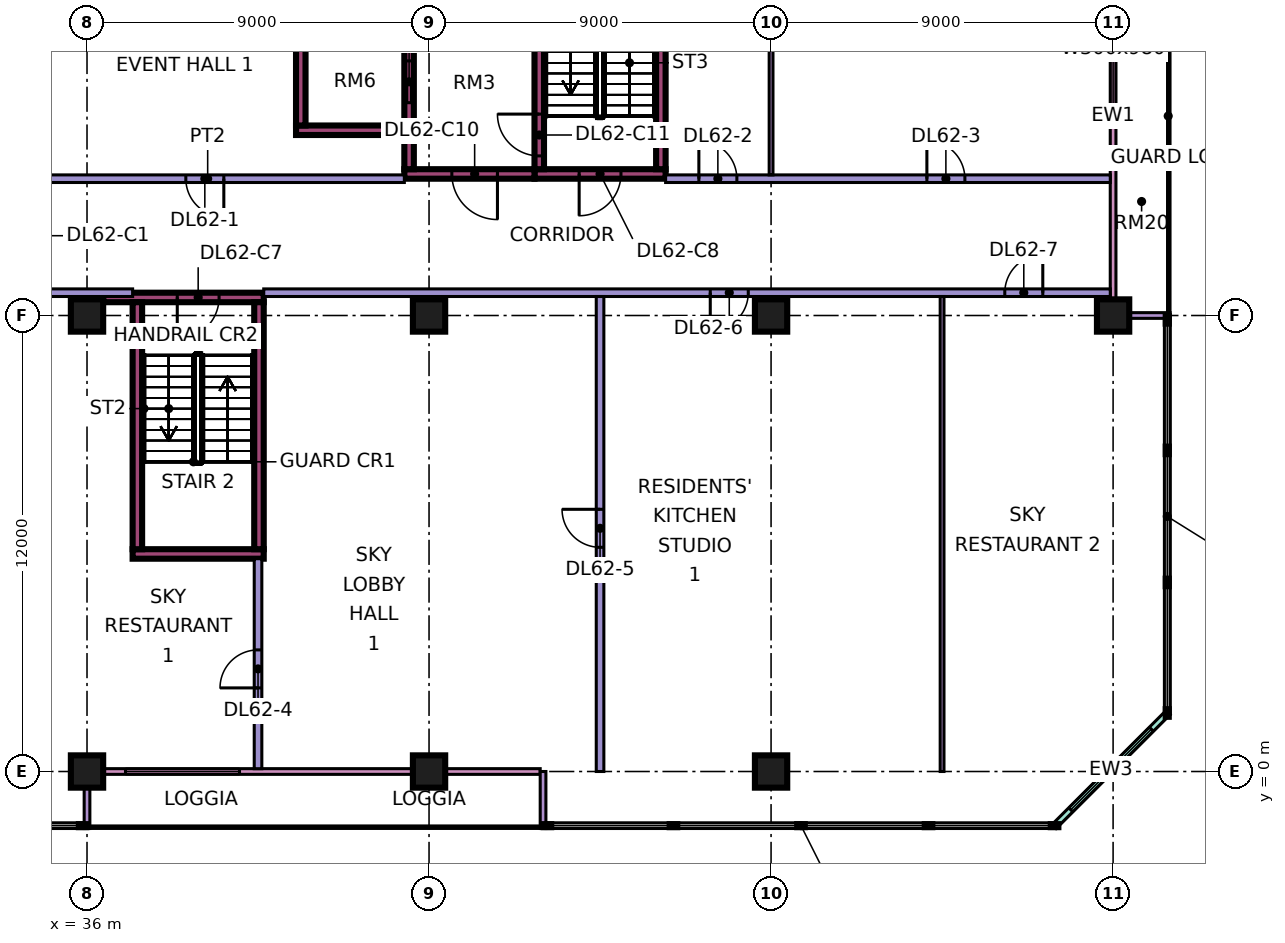
"""IFC4 building model, lengths in metres.
Left out: names, types, materials, properties, quantities, classifications, styles, units other than length and angle.
Written with IfcOpenShell. Run it as: python <this file> out.ifc"""

import sys

from ifc_helpers import new_model, si_unit, direction, frame, frame_2d, origin, origin_2d, place, context, subcontext, project, spatial, rectangle, extrude, element, fill, save


model = new_model("IFC4")
c1 = context("Model", 3, precision=1e-05, world=origin(), true_north=direction((0.0, 1.0)))
c2 = subcontext(c1, "Body", "Model", "MODEL_VIEW")
j1 = project(units=[si_unit("LENGTHUNIT", "METRE"), si_unit("PLANEANGLEUNIT", "RADIAN")], contexts=[c1])
p1 = place(None, origin())
s1 = spatial("IfcSite", under=j1, at=p1, CompositionType="ELEMENT")
p2 = place(p1, origin())
s2 = spatial("IfcBuilding", under=s1, at=p2, CompositionType="ELEMENT")
p3 = place(p2, frame((0.0, 0.0, 262.15)))
s3 = spatial("IfcBuildingStorey", under=s2, at=p3, CompositionType="ELEMENT", Elevation=262.15)
for number, where, z_axis, x_axis in (
    (1, (36.0, 0.0, 0.0), (0.0, 0.0, 1.0), (1.0, 0.0, 0.0)),
    (2, (36.0, 12.0, 0.0), (0.0, 0.0, 1.0), (1.0, 0.0, 0.0)),
    (3, (45.0, 0.0, 0.0), (0.0, 0.0, 1.0), (1.0, 0.0, 0.0)),
    (4, (45.0, 12.0, 0.0), (0.0, 0.0, 1.0), (1.0, 0.0, 0.0)),
    (5, (54.0, 0.0, 0.0), (0.0, 0.0, 1.0), (1.0, 0.0, 0.0)),
    (6, (54.0, 12.0, 0.0), (0.0, 0.0, 1.0), (1.0, 0.0, 0.0)),
    (7, (63.0, 12.0, 0.0), (0.0, 0.0, 1.0), (1.0, 0.0, 0.0)),
):
    element("IfcColumn", number, at=place(p3, frame(where, z_axis=z_axis, x_axis=x_axis)), inside=s3, PredefinedType="COLUMN", context=c2, shape_type="SweptSolid", body=[
        extrude(rectangle(XDim=0.85, YDim=0.85, at=origin_2d()), origin(), (0.0, 0.0, 1.0), 11.25),
    ])
p4 = place(p3, frame((37.2, 5.725, 0.0), z_axis=(0.0, 0.0, 1.0), x_axis=(1.0, 0.0, 0.0)))
e8 = element("IfcWall", 8, at=p4, inside=s3, PredefinedType="SHEAR", context=c2, shape_type="SweptSolid", body=[
    extrude(rectangle(XDim=3.45, YDim=0.25, at=frame_2d((1.725, 0.0))), origin(), (0.0, 0.0, 1.0), 11.25),
])
p5 = place(p3, frame((36.425, 12.475, 0.0), z_axis=(0.0, 0.0, 1.0), x_axis=(1.0, 0.0, 0.0)))
e9 = element("IfcWall", 9, at=p5, inside=s3, PredefinedType="SHEAR", context=c2, shape_type="SweptSolid", body=[
    extrude(rectangle(XDim=4.225, YDim=0.25, at=frame_2d((2.112, 0.0))), origin(), (0.0, 0.0, 1.0), 11.25),
])
p6 = place(p5, frame((1.95, 0.0, 0.0)))
e10 = element("IfcOpeningElement", 10, at=p6, cuts=e9, PredefinedType="OPENING", context=c2, shape_type="SweptSolid", body=[
    extrude(rectangle(XDim=1.1, YDim=2.2, at=frame_2d((0.55, 1.1))), frame((0.0, 0.135, 0.0), z_axis=(0.0, -1.0, 0.0), x_axis=(1.0, 0.0, 0.0)), (0.0, 0.0, 1.0), 0.27),
])
for number, where, z_axis, x_axis in (
    (11, (37.325, 5.85, 0.0), (0.0, 0.0, 1.0), (0.0, 1.0, 0.0)),
    (12, (40.525, 5.85, 0.0), (0.0, 0.0, 1.0), (0.0, 1.0, 0.0)),
):
    element("IfcWall", number, at=place(p3, frame(where, z_axis=z_axis, x_axis=x_axis)), inside=s3, PredefinedType="SHEAR", context=c2, shape_type="SweptSolid", body=[
        extrude(rectangle(XDim=6.5, YDim=0.25, at=frame_2d((3.25, 0.0))), origin(), (0.0, 0.0, 1.0), 11.25),
    ])
p7 = place(p3, frame((47.775, 15.725, 0.0), z_axis=(0.0, 0.0, 1.0), x_axis=(1.0, 0.0, 0.0)))
e13 = element("IfcWall", 13, at=p7, inside=s3, PredefinedType="SHEAR", context=c2, shape_type="SweptSolid", body=[
    extrude(rectangle(XDim=3.45, YDim=0.25, at=frame_2d((1.725, 0.0))), origin(), (0.0, 0.0, 1.0), 11.25),
])
p8 = place(p7, frame((1.175, 0.0, 0.0)))
e14 = element("IfcOpeningElement", 14, at=p8, cuts=e13, PredefinedType="OPENING", context=c2, shape_type="SweptSolid", body=[
    extrude(rectangle(XDim=1.1, YDim=2.2, at=frame_2d((0.55, 1.1))), frame((0.0, 0.135, 0.0), z_axis=(0.0, -1.0, 0.0), x_axis=(1.0, 0.0, 0.0)), (0.0, 0.0, 1.0), 0.27),
])
p9 = place(p3, frame((47.9, 15.85, 0.0), z_axis=(0.0, 0.0, 1.0), x_axis=(0.0, 1.0, 0.0)))
e15 = element("IfcWall", 15, at=p9, inside=s3, PredefinedType="SHEAR", context=c2, shape_type="SweptSolid", body=[
    extrude(rectangle(XDim=6.5, YDim=0.25, at=frame_2d((3.25, 0.0))), origin(), (0.0, 0.0, 1.0), 11.25),
])
p10 = place(p9, frame((0.35, 0.0, 0.0)))
e16 = element("IfcOpeningElement", 16, at=p10, cuts=e15, PredefinedType="OPENING", context=c2, shape_type="SweptSolid", body=[
    extrude(rectangle(XDim=1.1, YDim=2.2, at=frame_2d((0.55, 1.1))), frame((0.0, 0.135, 0.0), z_axis=(0.0, -1.0, 0.0), x_axis=(1.0, 0.0, 0.0)), (0.0, 0.0, 1.0), 0.27),
])
p11 = place(p3, frame((51.1, 15.85, 0.0), z_axis=(0.0, 0.0, 1.0), x_axis=(0.0, 1.0, 0.0)))
e17 = element("IfcWall", 17, at=p11, inside=s3, PredefinedType="SHEAR", context=c2, shape_type="SweptSolid", body=[
    extrude(rectangle(XDim=6.5, YDim=0.25, at=frame_2d((3.25, 0.0))), origin(), (0.0, 0.0, 1.0), 11.25),
])
p12 = place(p3, frame((44.35, 15.725, 0.0), z_axis=(0.0, 0.0, 1.0), x_axis=(1.0, 0.0, 0.0)))
e18 = element("IfcWall", 18, at=p12, inside=s3, PredefinedType="SHEAR", context=c2, shape_type="SweptSolid", body=[
    extrude(rectangle(XDim=3.425, YDim=0.25, at=frame_2d((1.712, 0.0))), origin(), (0.0, 0.0, 1.0), 11.25),
])
p13 = place(p12, frame((1.25, 0.0, 0.0)))
e19 = element("IfcOpeningElement", 19, at=p13, cuts=e18, PredefinedType="OPENING", context=c2, shape_type="SweptSolid", body=[
    extrude(rectangle(XDim=1.2, YDim=2.2, at=frame_2d((0.6, 1.1))), frame((0.0, 0.135, 0.0), z_axis=(0.0, -1.0, 0.0), x_axis=(1.0, 0.0, 0.0)), (0.0, 0.0, 1.0), 0.27),
])
p14 = place(p3, frame((44.475, 15.85, 0.0), z_axis=(0.0, 0.0, 1.0), x_axis=(0.0, 1.0, 0.0)))
e20 = element("IfcWall", 20, at=p14, inside=s3, PredefinedType="SHEAR", context=c2, shape_type="SweptSolid", body=[
    extrude(rectangle(XDim=6.5, YDim=0.25, at=frame_2d((3.25, 0.0))), origin(), (0.0, 0.0, 1.0), 11.25),
])
p15 = place(p14, frame((1.75, 0.0, 0.0)))
e21 = element("IfcOpeningElement", 21, at=p15, cuts=e20, PredefinedType="OPENING", context=c2, shape_type="SweptSolid", body=[
    extrude(rectangle(XDim=1.1, YDim=2.2, at=frame_2d((0.55, 1.1))), frame((0.0, 0.135, 0.0), z_axis=(0.0, -1.0, 0.0), x_axis=(1.0, 0.0, 0.0)), (0.0, 0.0, 1.0), 0.27),
])
p16 = place(p14, frame((4.3, 0.0, 0.0)))
e22 = element("IfcOpeningElement", 22, at=p16, cuts=e20, PredefinedType="OPENING", context=c2, shape_type="SweptSolid", body=[
    extrude(rectangle(XDim=1.1, YDim=2.2, at=frame_2d((0.55, 1.1))), frame((0.0, 0.135, 0.0), z_axis=(0.0, -1.0, 0.0), x_axis=(1.0, 0.0, 0.0)), (0.0, 0.0, 1.0), 0.27),
])
p17 = place(p3, frame((41.5, 16.875, 0.0), z_axis=(0.0, 0.0, 1.0), x_axis=(1.0, 0.0, 0.0)))
e23 = element("IfcWall", 23, at=p17, inside=s3, PredefinedType="SHEAR", context=c2, shape_type="SweptSolid", body=[
    extrude(rectangle(XDim=2.85, YDim=0.25, at=frame_2d((1.425, 0.0))), origin(), (0.0, 0.0, 1.0), 11.25),
])
p18 = place(p3, frame((41.625, 17.0, 0.0), z_axis=(0.0, 0.0, 1.0), x_axis=(0.0, 1.0, 0.0)))
e24 = element("IfcWall", 24, at=p18, inside=s3, PredefinedType="SHEAR", context=c2, shape_type="SweptSolid", body=[
    extrude(rectangle(XDim=2.3, YDim=0.25, at=frame_2d((1.15, 0.0))), origin(), (0.0, 0.0, 1.0), 11.25),
])
p19 = place(p3, frame((36.075, 0.0, 0.0), z_axis=(0.0, 0.0, 1.0), x_axis=(1.0, 0.0, 0.0)))
e25 = element("IfcWall", 25, at=p19, inside=s3, PredefinedType="SOLIDWALL", context=c2, shape_type="SweptSolid", body=[
    extrude(rectangle(XDim=11.85, YDim=0.15, at=frame_2d((5.925, 0.0))), origin(), (0.0, 0.0, 1.0), 10.85),
])
p20 = place(p19, frame((0.938, 0.0, 0.45)))
e26 = element("IfcOpeningElement", 26, at=p20, cuts=e25, PredefinedType="OPENING", context=c2, shape_type="SweptSolid", body=[
    extrude(rectangle(XDim=3.0, YDim=9.8, at=frame_2d((1.5, 4.9))), frame((0.0, 0.085, 0.0), z_axis=(0.0, -1.0, 0.0), x_axis=(1.0, 0.0, 0.0)), (0.0, 0.0, 1.0), 0.17),
])
for number, where, z_axis, x_axis in (
    (27, (36.0, -1.5, 0.0), (0.0, 0.0, 1.0), (0.0, 1.0, 0.0)),
    (28, (48.0, -1.5, 0.0), (0.0, 0.0, 1.0), (0.0, 1.0, 0.0)),
):
    element("IfcWall", number, at=place(p3, frame(where, z_axis=z_axis, x_axis=x_axis)), inside=s3, PredefinedType="SOLIDWALL", context=c2, shape_type="SweptSolid", body=[
        extrude(rectangle(XDim=1.5, YDim=0.15, at=frame_2d((0.75, 0.0))), origin(), (0.0, 0.0, 1.0), 10.85),
    ])
p21 = place(p3, frame((61.447, -1.447, 0.0), z_axis=(0.0, 0.0, 1.0), x_axis=(0.707106781187, 0.707106781187, 0.0)))
e29 = element("IfcWall", 29, at=p21, inside=s3, PredefinedType="SOLIDWALL", context=c2, shape_type="SweptSolid", body=[
    extrude(rectangle(XDim=4.243, YDim=0.15, at=frame_2d((2.121, 0.0))), origin(), (0.0, 0.0, 1.0), 10.85),
])
p22 = place(p21, frame((0.621, 0.0, 0.45)))
e30 = element("IfcOpeningElement", 30, at=p22, cuts=e29, PredefinedType="OPENING", context=c2, shape_type="SweptSolid", body=[
    extrude(rectangle(XDim=3.0, YDim=9.8, at=frame_2d((1.5, 4.9))), frame((0.0, 0.085, 0.0), z_axis=(0.0, -1.0, 0.0), x_axis=(1.0, 0.0, 0.0)), (0.0, 0.0, 1.0), 0.17),
])
p23 = place(p3, frame((63.0, 12.075, 0.0), z_axis=(0.0, 0.0, 1.0), x_axis=(0.0, 1.0, 0.0)))
e31 = element("IfcWall", 31, at=p23, inside=s3, PredefinedType="SOLIDWALL", context=c2, shape_type="SweptSolid", body=[
    extrude(rectangle(XDim=10.35, YDim=0.15, at=frame_2d((5.175, 0.0))), origin(), (0.0, 0.0, 1.0), 10.85),
])
p24 = place(p23, frame((5.438, 0.0, 0.45)))
e32 = element("IfcOpeningElement", 32, at=p24, cuts=e31, PredefinedType="OPENING", context=c2, shape_type="SweptSolid", body=[
    extrude(rectangle(XDim=3.0, YDim=9.8, at=frame_2d((1.5, 4.9))), frame((0.0, 0.085, 0.0), z_axis=(0.0, -1.0, 0.0), x_axis=(1.0, 0.0, 0.0)), (0.0, 0.0, 1.0), 0.17),
])
p25 = place(p3, frame((64.5, 12.0, 0.0), z_axis=(0.0, 0.0, 1.0), x_axis=(-1.0, 0.0, 0.0)))
e33 = element("IfcWall", 33, at=p25, inside=s3, PredefinedType="SOLIDWALL", context=c2, shape_type="SweptSolid", body=[
    extrude(rectangle(XDim=1.5, YDim=0.15, at=frame_2d((0.75, 0.0))), origin(), (0.0, 0.0, 1.0), 10.85),
])
p26 = place(p3, frame((34.0, 12.6, 0.0), z_axis=(0.0, 0.0, 1.0), x_axis=(1.0, 0.0, 0.0)))
e34 = element("IfcWall", 34, at=p26, inside=s3, PredefinedType="PARTITIONING", context=c2, shape_type="SweptSolid", body=[
    extrude(rectangle(XDim=3.2, YDim=0.2, at=frame_2d((1.6, 0.0))), origin(), (0.0, 0.0, 1.0), 10.85),
])
p27 = place(p3, frame((34.0, 15.6, 0.0), z_axis=(0.0, 0.0, 1.0), x_axis=(1.0, 0.0, 0.0)))
e35 = element("IfcWall", 35, at=p27, inside=s3, PredefinedType="PARTITIONING", context=c2, shape_type="SweptSolid", body=[
    extrude(rectangle(XDim=10.35, YDim=0.2, at=frame_2d((5.175, 0.0))), origin(), (0.0, 0.0, 1.0), 10.85),
])
p28 = place(p27, frame((4.6, 0.0, 0.0)))
e36 = element("IfcOpeningElement", 36, at=p28, cuts=e35, PredefinedType="OPENING", context=c2, shape_type="SweptSolid", body=[
    extrude(rectangle(XDim=1.0, YDim=2.1, at=frame_2d((0.5, 1.05))), frame((0.0, 0.11, 0.0), z_axis=(0.0, -1.0, 0.0), x_axis=(1.0, 0.0, 0.0)), (0.0, 0.0, 1.0), 0.22),
])
p29 = place(p3, frame((40.5, 0.074, 0.0), z_axis=(0.0, 0.0, 1.0), x_axis=(0.0, 1.0, 0.0)))
e37 = element("IfcWall", 37, at=p29, inside=s3, PredefinedType="PARTITIONING", context=c2, shape_type="SweptSolid", body=[
    extrude(rectangle(XDim=5.526, YDim=0.2, at=frame_2d((2.763, 0.0))), origin(), (0.0, 0.0, 1.0), 10.85),
])
p30 = place(p29, frame((2.126, 0.0, 0.0)))
e38 = element("IfcOpeningElement", 38, at=p30, cuts=e37, PredefinedType="OPENING", context=c2, shape_type="SweptSolid", body=[
    extrude(rectangle(XDim=1.0, YDim=2.1, at=frame_2d((0.5, 1.05))), frame((0.0, 0.11, 0.0), z_axis=(0.0, -1.0, 0.0), x_axis=(1.0, 0.0, 0.0)), (0.0, 0.0, 1.0), 0.22),
])
p31 = place(p3, frame((40.65, 12.6, 0.0), z_axis=(0.0, 0.0, 1.0), x_axis=(1.0, 0.0, 0.0)))
e39 = element("IfcWall", 39, at=p31, inside=s3, PredefinedType="PARTITIONING", context=c2, shape_type="SweptSolid", body=[
    extrude(rectangle(XDim=22.276, YDim=0.2, at=frame_2d((11.138, 0.0))), origin(), (0.0, 0.0, 1.0), 10.85),
])
p32 = place(p31, frame((11.75, 0.0, 0.0)))
e40 = element("IfcOpeningElement", 40, at=p32, cuts=e39, PredefinedType="OPENING", context=c2, shape_type="SweptSolid", body=[
    extrude(rectangle(XDim=1.0, YDim=2.1, at=frame_2d((0.5, 1.05))), frame((0.0, 0.11, 0.0), z_axis=(0.0, -1.0, 0.0), x_axis=(1.0, 0.0, 0.0)), (0.0, 0.0, 1.0), 0.22),
])
p33 = place(p31, frame((19.5, 0.0, 0.0)))
e41 = element("IfcOpeningElement", 41, at=p33, cuts=e39, PredefinedType="OPENING", context=c2, shape_type="SweptSolid", body=[
    extrude(rectangle(XDim=1.0, YDim=2.1, at=frame_2d((0.5, 1.05))), frame((0.0, 0.11, 0.0), z_axis=(0.0, -1.0, 0.0), x_axis=(1.0, 0.0, 0.0)), (0.0, 0.0, 1.0), 0.22),
])
p34 = place(p3, frame((49.5, 0.0, 0.0), z_axis=(0.0, 0.0, 1.0), x_axis=(0.0, 1.0, 0.0)))
e42 = element("IfcWall", 42, at=p34, inside=s3, PredefinedType="PARTITIONING", context=c2, shape_type="SweptSolid", body=[
    extrude(rectangle(XDim=12.5, YDim=0.2, at=frame_2d((6.25, 0.0))), origin(), (0.0, 0.0, 1.0), 10.85),
])
p35 = place(p34, frame((5.9, 0.0, 0.0)))
e43 = element("IfcOpeningElement", 43, at=p35, cuts=e42, PredefinedType="OPENING", context=c2, shape_type="SweptSolid", body=[
    extrude(rectangle(XDim=1.0, YDim=2.1, at=frame_2d((0.5, 1.05))), frame((0.0, 0.11, 0.0), z_axis=(0.0, -1.0, 0.0), x_axis=(1.0, 0.0, 0.0)), (0.0, 0.0, 1.0), 0.22),
])
p36 = place(p3, frame((51.225, 15.6, 0.0), z_axis=(0.0, 0.0, 1.0), x_axis=(1.0, 0.0, 0.0)))
e44 = element("IfcWall", 44, at=p36, inside=s3, PredefinedType="PARTITIONING", context=c2, shape_type="SweptSolid", body=[
    extrude(rectangle(XDim=11.701, YDim=0.2, at=frame_2d((5.851, 0.0))), origin(), (0.0, 0.0, 1.0), 10.85),
])
p37 = place(p36, frame((0.875, 0.0, 0.0)))
e45 = element("IfcOpeningElement", 45, at=p37, cuts=e44, PredefinedType="OPENING", context=c2, shape_type="SweptSolid", body=[
    extrude(rectangle(XDim=1.0, YDim=2.1, at=frame_2d((0.5, 1.05))), frame((0.0, 0.11, 0.0), z_axis=(0.0, -1.0, 0.0), x_axis=(1.0, 0.0, 0.0)), (0.0, 0.0, 1.0), 0.22),
])
p38 = place(p36, frame((6.875, 0.0, 0.0)))
e46 = element("IfcOpeningElement", 46, at=p38, cuts=e44, PredefinedType="OPENING", context=c2, shape_type="SweptSolid", body=[
    extrude(rectangle(XDim=1.0, YDim=2.1, at=frame_2d((0.5, 1.05))), frame((0.0, 0.11, 0.0), z_axis=(0.0, -1.0, 0.0), x_axis=(1.0, 0.0, 0.0)), (0.0, 0.0, 1.0), 0.22),
])
p39 = place(p3, frame((54.0, 15.7, 0.0), z_axis=(0.0, 0.0, 1.0), x_axis=(0.0, 1.0, 0.0)))
e47 = element("IfcWall", 47, at=p39, inside=s3, PredefinedType="PARTITIONING", context=c2, shape_type="SweptSolid", body=[
    extrude(rectangle(XDim=8.3, YDim=0.1, at=frame_2d((4.15, 0.0))), origin(), (0.0, 0.0, 1.0), 10.85),
])
p40 = place(p3, frame((58.5, 0.0, 0.0), z_axis=(0.0, 0.0, 1.0), x_axis=(0.0, 1.0, 0.0)))
e48 = element("IfcWall", 48, at=p40, inside=s3, PredefinedType="PARTITIONING", context=c2, shape_type="SweptSolid", body=[
    extrude(rectangle(XDim=12.5, YDim=0.1, at=frame_2d((6.25, 0.0))), origin(), (0.0, 0.0, 1.0), 10.85),
])
p41 = place(p20, origin())
e49 = element("IfcWindow", 49, at=p41, inside=s3, PartitioningType="SINGLE_PANEL", PredefinedType="WINDOW", context=c2, shape_type="SweptSolid", body=[
    extrude(rectangle(XDim=3.0, YDim=9.8, at=frame_2d((1.5, 4.9))), frame((0.0, 0.03, 0.0), z_axis=(0.0, -1.0, 0.0), x_axis=(1.0, 0.0, 0.0)), (0.0, 0.0, 1.0), 0.06),
])
fill(e26, e49)
p42 = place(p22, origin())
e50 = element("IfcWindow", 50, at=p42, inside=s3, PartitioningType="SINGLE_PANEL", PredefinedType="WINDOW", context=c2, shape_type="SweptSolid", body=[
    extrude(rectangle(XDim=3.0, YDim=9.8, at=frame_2d((1.5, 4.9))), frame((0.0, 0.03, 0.0), z_axis=(0.0, -1.0, 0.0), x_axis=(1.0, 0.0, 0.0)), (0.0, 0.0, 1.0), 0.06),
])
fill(e30, e50)
p43 = place(p24, origin())
e51 = element("IfcWindow", 51, at=p43, inside=s3, PartitioningType="SINGLE_PANEL", PredefinedType="WINDOW", context=c2, shape_type="SweptSolid", body=[
    extrude(rectangle(XDim=3.0, YDim=9.8, at=frame_2d((1.5, 4.9))), frame((0.0, 0.03, 0.0), z_axis=(0.0, -1.0, 0.0), x_axis=(1.0, 0.0, 0.0)), (0.0, 0.0, 1.0), 0.06),
])
fill(e32, e51)
p44 = place(p6, frame((1.1, 0.0, 0.0), z_axis=(0.0, 0.0, 1.0), x_axis=(-1.0, 0.0, 0.0)))
e52 = element("IfcDoor", 52, at=p44, inside=s3, OperationType="SINGLE_SWING_LEFT", PredefinedType="DOOR", context=c2, shape_type="SweptSolid", body=[
    extrude(rectangle(XDim=1.1, YDim=2.2, at=frame_2d((0.55, 1.1))), frame((0.0, 0.025, 0.0), z_axis=(0.0, -1.0, 0.0), x_axis=(1.0, 0.0, 0.0)), (0.0, 0.0, 1.0), 0.05),
])
fill(e10, e52)
p45 = place(p8, frame((1.1, 0.0, 0.0), z_axis=(0.0, 0.0, 1.0), x_axis=(-1.0, 0.0, 0.0)))
e53 = element("IfcDoor", 53, at=p45, inside=s3, OperationType="SINGLE_SWING_LEFT", PredefinedType="DOOR", context=c2, shape_type="SweptSolid", body=[
    extrude(rectangle(XDim=1.1, YDim=2.2, at=frame_2d((0.55, 1.1))), frame((0.0, 0.025, 0.0), z_axis=(0.0, -1.0, 0.0), x_axis=(1.0, 0.0, 0.0)), (0.0, 0.0, 1.0), 0.05),
])
fill(e14, e53)
p46 = place(p13, origin())
e54 = element("IfcDoor", 54, at=p46, inside=s3, OperationType="SINGLE_SWING_RIGHT", PredefinedType="DOOR", context=c2, shape_type="SweptSolid", body=[
    extrude(rectangle(XDim=1.2, YDim=2.2, at=frame_2d((0.6, 1.1))), frame((0.0, 0.025, 0.0), z_axis=(0.0, -1.0, 0.0), x_axis=(1.0, 0.0, 0.0)), (0.0, 0.0, 1.0), 0.05),
])
fill(e19, e54)
p47 = place(p10, frame((1.1, 0.0, 0.0), z_axis=(0.0, 0.0, 1.0), x_axis=(-1.0, 0.0, 0.0)))
e55 = element("IfcDoor", 55, at=p47, inside=s3, OperationType="SINGLE_SWING_RIGHT", PredefinedType="DOOR", context=c2, shape_type="SweptSolid", body=[
    extrude(rectangle(XDim=1.1, YDim=2.2, at=frame_2d((0.55, 1.1))), frame((0.0, 0.025, 0.0), z_axis=(0.0, -1.0, 0.0), x_axis=(1.0, 0.0, 0.0)), (0.0, 0.0, 1.0), 0.05),
])
fill(e16, e55)
p48 = place(p15, origin())
e56 = element("IfcDoor", 56, at=p48, inside=s3, OperationType="DOUBLE_DOOR_SLIDING", PredefinedType="DOOR", context=c2, shape_type="SweptSolid", body=[
    extrude(rectangle(XDim=1.1, YDim=2.2, at=frame_2d((0.55, 1.1))), frame((0.0, 0.025, 0.0), z_axis=(0.0, -1.0, 0.0), x_axis=(1.0, 0.0, 0.0)), (0.0, 0.0, 1.0), 0.05),
])
fill(e21, e56)
p49 = place(p28, origin())
e57 = element("IfcDoor", 57, at=p49, inside=s3, OperationType="SINGLE_SWING_RIGHT", PredefinedType="DOOR", context=c2, shape_type="SweptSolid", body=[
    extrude(rectangle(XDim=1.0, YDim=2.1, at=frame_2d((0.5, 1.05))), frame((0.0, 0.025, 0.0), z_axis=(0.0, -1.0, 0.0), x_axis=(1.0, 0.0, 0.0)), (0.0, 0.0, 1.0), 0.05),
])
fill(e36, e57)
p50 = place(p37, origin())
e58 = element("IfcDoor", 58, at=p50, inside=s3, OperationType="SINGLE_SWING_LEFT", PredefinedType="DOOR", context=c2, shape_type="SweptSolid", body=[
    extrude(rectangle(XDim=1.0, YDim=2.1, at=frame_2d((0.5, 1.05))), frame((0.0, 0.025, 0.0), z_axis=(0.0, -1.0, 0.0), x_axis=(1.0, 0.0, 0.0)), (0.0, 0.0, 1.0), 0.05),
])
fill(e45, e58)
p51 = place(p38, origin())
e59 = element("IfcDoor", 59, at=p51, inside=s3, OperationType="SINGLE_SWING_LEFT", PredefinedType="DOOR", context=c2, shape_type="SweptSolid", body=[
    extrude(rectangle(XDim=1.0, YDim=2.1, at=frame_2d((0.5, 1.05))), frame((0.0, 0.025, 0.0), z_axis=(0.0, -1.0, 0.0), x_axis=(1.0, 0.0, 0.0)), (0.0, 0.0, 1.0), 0.05),
])
fill(e46, e59)
p52 = place(p30, origin())
e60 = element("IfcDoor", 60, at=p52, inside=s3, OperationType="SINGLE_SWING_LEFT", PredefinedType="DOOR", context=c2, shape_type="SweptSolid", body=[
    extrude(rectangle(XDim=1.0, YDim=2.1, at=frame_2d((0.5, 1.05))), frame((0.0, 0.025, 0.0), z_axis=(0.0, -1.0, 0.0), x_axis=(1.0, 0.0, 0.0)), (0.0, 0.0, 1.0), 0.05),
])
fill(e38, e60)
p53 = place(p35, frame((1.0, 0.0, 0.0), z_axis=(0.0, 0.0, 1.0), x_axis=(-1.0, 0.0, 0.0)))
e61 = element("IfcDoor", 61, at=p53, inside=s3, OperationType="SINGLE_SWING_RIGHT", PredefinedType="DOOR", context=c2, shape_type="SweptSolid", body=[
    extrude(rectangle(XDim=1.0, YDim=2.1, at=frame_2d((0.5, 1.05))), frame((0.0, 0.025, 0.0), z_axis=(0.0, -1.0, 0.0), x_axis=(1.0, 0.0, 0.0)), (0.0, 0.0, 1.0), 0.05),
])
fill(e43, e61)
p54 = place(p32, frame((1.0, 0.0, 0.0), z_axis=(0.0, 0.0, 1.0), x_axis=(-1.0, 0.0, 0.0)))
e62 = element("IfcDoor", 62, at=p54, inside=s3, OperationType="SINGLE_SWING_LEFT", PredefinedType="DOOR", context=c2, shape_type="SweptSolid", body=[
    extrude(rectangle(XDim=1.0, YDim=2.1, at=frame_2d((0.5, 1.05))), frame((0.0, 0.025, 0.0), z_axis=(0.0, -1.0, 0.0), x_axis=(1.0, 0.0, 0.0)), (0.0, 0.0, 1.0), 0.05),
])
fill(e40, e62)
p55 = place(p33, frame((1.0, 0.0, 0.0), z_axis=(0.0, 0.0, 1.0), x_axis=(-1.0, 0.0, 0.0)))
e63 = element("IfcDoor", 63, at=p55, inside=s3, OperationType="SINGLE_SWING_RIGHT", PredefinedType="DOOR", context=c2, shape_type="SweptSolid", body=[
    extrude(rectangle(XDim=1.0, YDim=2.1, at=frame_2d((0.5, 1.05))), frame((0.0, 0.025, 0.0), z_axis=(0.0, -1.0, 0.0), x_axis=(1.0, 0.0, 0.0)), (0.0, 0.0, 1.0), 0.05),
])
fill(e41, e63)
save(model, sys.argv[1])
